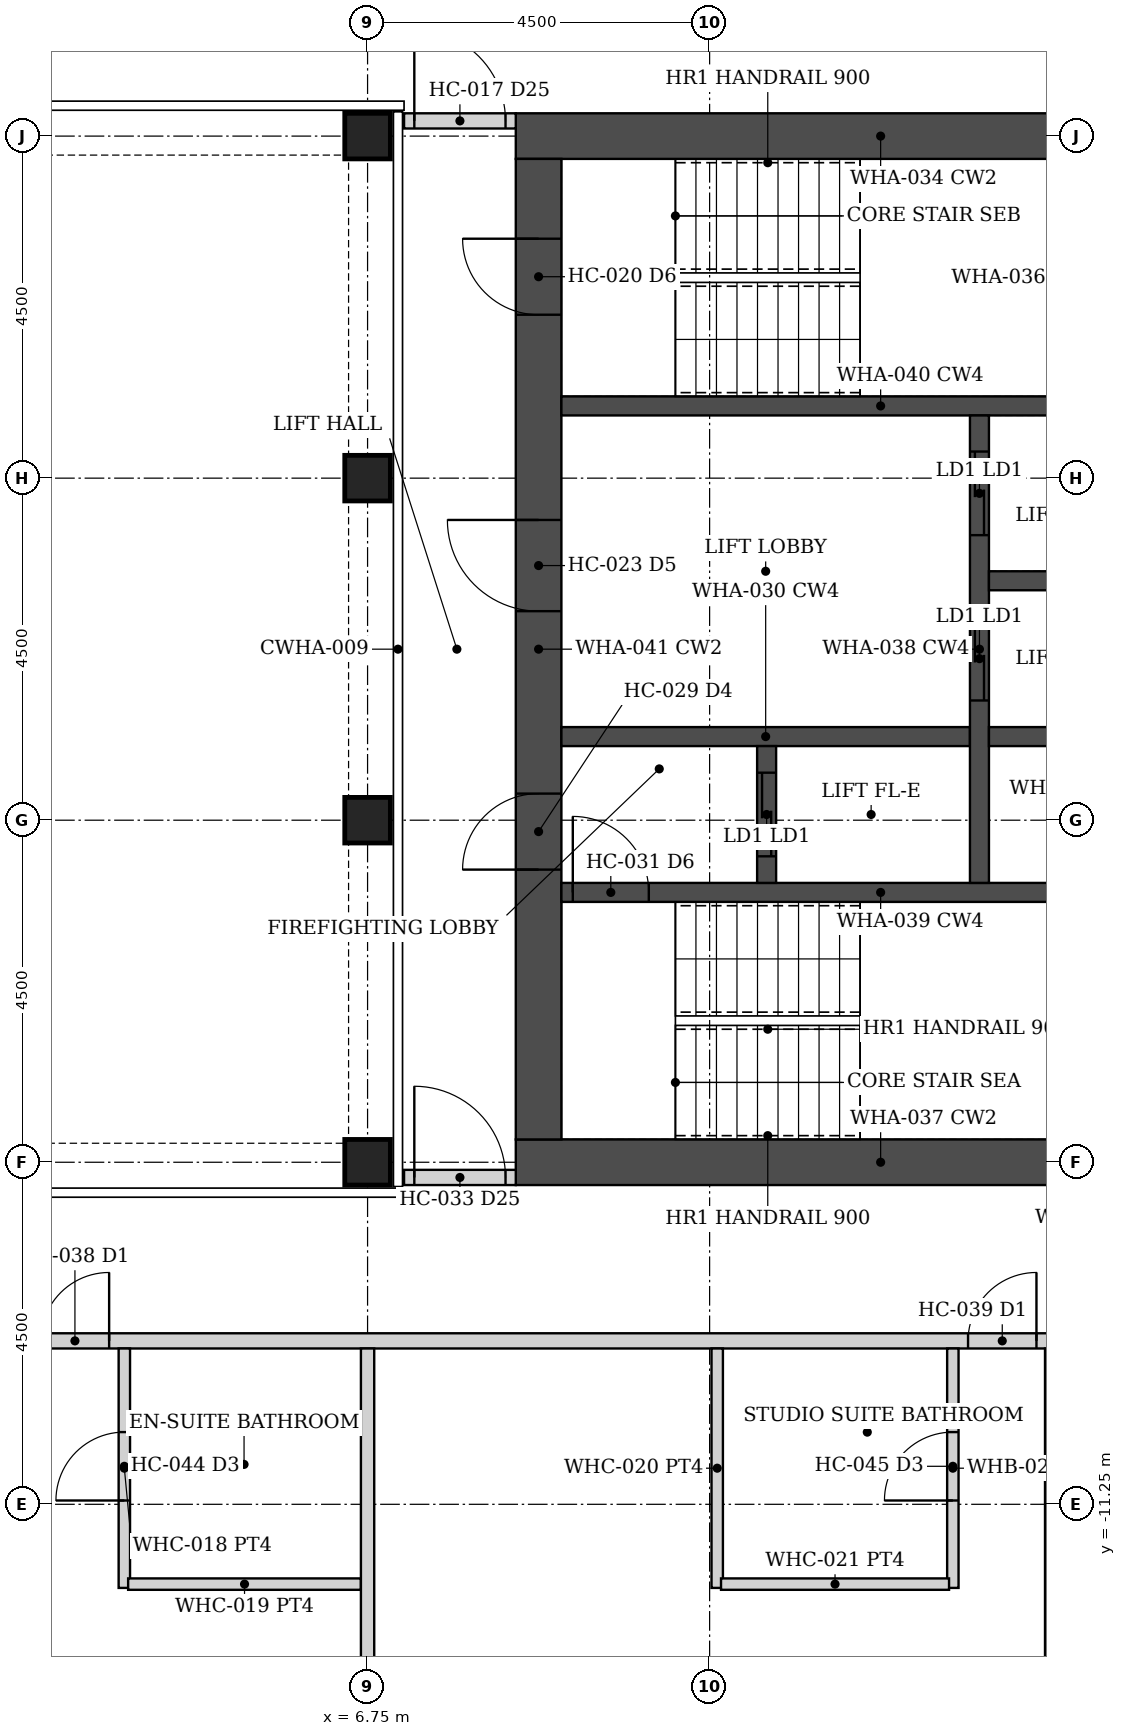
"""IFC4 building model, lengths in metres.
Left out: names, types, materials, properties, quantities, classifications, styles, units other than length and angle.
Written with IfcOpenShell. Run it as: python <this file> out.ifc"""

import sys

from ifc_helpers import new_model, si_unit, direction, frame, frame_2d, origin, origin_2d, place, context, subcontext, project, spatial, rectangle, hollow_rectangle, extrude, element, fill, save


model = new_model("IFC4")
c1 = context("Model", 3, precision=1e-05, world=origin(), true_north=direction((0.0, 1.0)))
c2 = subcontext(c1, "Body", "Model", "MODEL_VIEW")
j1 = project(units=[si_unit("LENGTHUNIT", "METRE"), si_unit("PLANEANGLEUNIT", "RADIAN")], contexts=[c1])
p1 = place(None, origin())
s1 = spatial("IfcSite", under=j1, at=p1, CompositionType="ELEMENT")
p2 = place(p1, origin())
s2 = spatial("IfcBuilding", under=s1, at=p2, CompositionType="ELEMENT")
p3 = place(p2, frame((0.0, 0.0, 140.0)))
s3 = spatial("IfcBuildingStorey", under=s2, at=p3, CompositionType="ELEMENT", Elevation=140.0)
for number, where, z_axis, x_axis in (
    (1, (6.75, -6.75, 0.0), (0.0, 0.0, 1.0), (1.0, 0.0, 0.0)),
    (2, (6.75, -2.25, 0.0), (0.0, 0.0, 1.0), (1.0, 0.0, 0.0)),
    (3, (6.75, 2.25, 0.0), (0.0, 0.0, 1.0), (1.0, 0.0, 0.0)),
    (4, (6.75, 6.75, 0.0), (0.0, 0.0, 1.0), (1.0, 0.0, 0.0)),
):
    element("IfcColumn", number, at=place(p3, frame(where, z_axis=z_axis, x_axis=x_axis)), inside=s3, PredefinedType="COLUMN", context=c2, shape_type="SweptSolid", body=[
        extrude(hollow_rectangle(XDim=0.6, YDim=0.6, WallThickness=0.04, at=origin_2d()), origin(), (0.0, 0.0, 1.0), 3.6),
    ])
for number, where, z_axis, x_axis in (
    (5, (8.7, -6.75, 0.0), (0.0, 0.0, 1.0), (1.0, 0.0, 0.0)),
    (6, (8.7, 6.75, 0.0), (0.0, 0.0, 1.0), (1.0, 0.0, 0.0)),
):
    element("IfcWall", number, at=place(p3, frame(where, z_axis=z_axis, x_axis=x_axis)), inside=s3, PredefinedType="SHEAR", context=c2, shape_type="SweptSolid", body=[
        extrude(rectangle(XDim=9.6, YDim=0.6, at=frame_2d((4.8, 0.0))), origin(), (0.0, 0.0, 1.0), 3.6),
    ])
p4 = place(p3, frame((9.0, -6.45, 0.0), z_axis=(0.0, 0.0, 1.0), x_axis=(0.0, 1.0, 0.0)))
e7 = element("IfcWall", 7, at=p4, inside=s3, PredefinedType="SHEAR", context=c2, shape_type="SweptSolid", body=[
    extrude(rectangle(XDim=12.9, YDim=0.6, at=frame_2d((6.45, 0.0))), origin(), (0.0, 0.0, 1.0), 3.6),
])
p5 = place(p4, frame((3.55, 0.0, 0.0)))
e8 = element("IfcOpeningElement", 8, at=p5, cuts=e7, PredefinedType="OPENING", context=c2, shape_type="SweptSolid", body=[
    extrude(rectangle(XDim=1.0, YDim=2.1, at=frame_2d((0.5, 1.05))), frame((0.0, 0.31, 0.0), z_axis=(0.0, -1.0, 0.0), x_axis=(1.0, 0.0, 0.0)), (0.0, 0.0, 1.0), 0.62),
])
p6 = place(p4, frame((6.95, 0.0, 0.0)))
e9 = element("IfcOpeningElement", 9, at=p6, cuts=e7, PredefinedType="OPENING", context=c2, shape_type="SweptSolid", body=[
    extrude(rectangle(XDim=1.2, YDim=2.1, at=frame_2d((0.6, 1.05))), frame((0.0, 0.31, 0.0), z_axis=(0.0, -1.0, 0.0), x_axis=(1.0, 0.0, 0.0)), (0.0, 0.0, 1.0), 0.62),
])
p7 = place(p4, frame((10.85, 0.0, 0.0)))
e10 = element("IfcOpeningElement", 10, at=p7, cuts=e7, PredefinedType="OPENING", context=c2, shape_type="SweptSolid", body=[
    extrude(rectangle(XDim=1.0, YDim=2.1, at=frame_2d((0.5, 1.05))), frame((0.0, 0.31, 0.0), z_axis=(0.0, -1.0, 0.0), x_axis=(1.0, 0.0, 0.0)), (0.0, 0.0, 1.0), 0.62),
])
p8 = place(p3, frame((9.3, -3.2, 0.0), z_axis=(0.0, 0.0, 1.0), x_axis=(1.0, 0.0, 0.0)))
e11 = element("IfcWall", 11, at=p8, inside=s3, PredefinedType="SHEAR", context=c2, shape_type="SweptSolid", body=[
    extrude(rectangle(XDim=8.4, YDim=0.25, at=frame_2d((4.2, 0.0))), origin(), (0.0, 0.0, 1.0), 3.6),
])
p9 = place(p8, frame((0.15, 0.0, 0.0)))
e12 = element("IfcOpeningElement", 12, at=p9, cuts=e11, PredefinedType="OPENING", context=c2, shape_type="SweptSolid", body=[
    extrude(rectangle(XDim=1.0, YDim=2.1, at=frame_2d((0.5, 1.05))), frame((0.0, 0.135, 0.0), z_axis=(0.0, -1.0, 0.0), x_axis=(1.0, 0.0, 0.0)), (0.0, 0.0, 1.0), 0.27),
])
p10 = place(p3, frame((9.3, 3.2, 0.0), z_axis=(0.0, 0.0, 1.0), x_axis=(1.0, 0.0, 0.0)))
e13 = element("IfcWall", 13, at=p10, inside=s3, PredefinedType="SHEAR", context=c2, shape_type="SweptSolid", body=[
    extrude(rectangle(XDim=8.4, YDim=0.25, at=frame_2d((4.2, 0.0))), origin(), (0.0, 0.0, 1.0), 3.6),
])
p11 = place(p3, frame((9.3, -1.15, 0.0), z_axis=(0.0, 0.0, 1.0), x_axis=(1.0, 0.0, 0.0)))
e14 = element("IfcWall", 14, at=p11, inside=s3, PredefinedType="SHEAR", context=c2, shape_type="SweptSolid", body=[
    extrude(rectangle(XDim=5.375, YDim=0.25, at=frame_2d((2.688, 0.0))), origin(), (0.0, 0.0, 1.0), 3.6),
])
p12 = place(p3, frame((12.0, -3.075, 0.0), z_axis=(0.0, 0.0, 1.0), x_axis=(0.0, 1.0, 0.0)))
e15 = element("IfcWall", 15, at=p12, inside=s3, PredefinedType="SHEAR", context=c2, shape_type="SweptSolid", body=[
    extrude(rectangle(XDim=1.8, YDim=0.25, at=frame_2d((0.9, 0.0))), origin(), (0.0, 0.0, 1.0), 3.6),
])
p13 = place(p12, frame((0.35, 0.0, 0.0)))
e16 = element("IfcOpeningElement", 16, at=p13, cuts=e15, PredefinedType="OPENING", context=c2, shape_type="SweptSolid", body=[
    extrude(rectangle(XDim=1.1, YDim=2.1, at=frame_2d((0.55, 1.05))), frame((0.0, 0.135, 0.0), z_axis=(0.0, -1.0, 0.0), x_axis=(1.0, 0.0, 0.0)), (0.0, 0.0, 1.0), 0.27),
])
p14 = place(p3, frame((14.8, -3.075, 0.0), z_axis=(0.0, 0.0, 1.0), x_axis=(0.0, 1.0, 0.0)))
e17 = element("IfcWall", 17, at=p14, inside=s3, PredefinedType="SHEAR", context=c2, shape_type="SweptSolid", body=[
    extrude(rectangle(XDim=6.15, YDim=0.25, at=frame_2d((3.075, 0.0))), origin(), (0.0, 0.0, 1.0), 3.6),
])
p15 = place(p14, frame((2.4, 0.0, 0.0)))
e18 = element("IfcOpeningElement", 18, at=p15, cuts=e17, PredefinedType="OPENING", context=c2, shape_type="SweptSolid", body=[
    extrude(rectangle(XDim=1.1, YDim=2.1, at=frame_2d((0.55, 1.05))), frame((0.0, 0.135, 0.0), z_axis=(0.0, -1.0, 0.0), x_axis=(1.0, 0.0, 0.0)), (0.0, 0.0, 1.0), 0.27),
])
p16 = place(p14, frame((4.575, 0.0, 0.0)))
e19 = element("IfcOpeningElement", 19, at=p16, cuts=e17, PredefinedType="OPENING", context=c2, shape_type="SweptSolid", body=[
    extrude(rectangle(XDim=1.1, YDim=2.1, at=frame_2d((0.55, 1.05))), frame((0.0, 0.135, 0.0), z_axis=(0.0, -1.0, 0.0), x_axis=(1.0, 0.0, 0.0)), (0.0, 0.0, 1.0), 0.27),
])
for number, where, z_axis, x_axis in (
    (20, (14.925, -1.15, 0.0), (0.0, 0.0, 1.0), (1.0, 0.0, 0.0)),
    (21, (14.925, 0.9, 0.0), (0.0, 0.0, 1.0), (1.0, 0.0, 0.0)),
):
    element("IfcWall", number, at=place(p3, frame(where, z_axis=z_axis, x_axis=x_axis)), inside=s3, PredefinedType="SHEAR", context=c2, shape_type="SweptSolid", body=[
        extrude(rectangle(XDim=2.775, YDim=0.25, at=frame_2d((1.387, 0.0))), origin(), (0.0, 0.0, 1.0), 3.6),
    ])
p17 = place(p3, frame((7.23, 6.95, 0.0), z_axis=(0.0, 0.0, 1.0), x_axis=(1.0, 0.0, 0.0)))
e22 = element("IfcWall", 22, at=p17, inside=s3, PredefinedType="PARTITIONING", context=c2, shape_type="SweptSolid", body=[
    extrude(rectangle(XDim=1.47, YDim=0.2, at=frame_2d((0.735, 0.0))), origin(), (0.0, 0.0, 1.0), 2.473),
])
p18 = place(p17, frame((0.135, 0.0, 0.0)))
e23 = element("IfcOpeningElement", 23, at=p18, cuts=e22, PredefinedType="OPENING", context=c2, shape_type="SweptSolid", body=[
    extrude(rectangle(XDim=1.2, YDim=2.1, at=frame_2d((0.6, 1.05))), frame((0.0, 0.11, 0.0), z_axis=(0.0, -1.0, 0.0), x_axis=(1.0, 0.0, 0.0)), (0.0, 0.0, 1.0), 0.22),
])
p19 = place(p3, frame((7.23, -6.95, 0.0), z_axis=(0.0, 0.0, 1.0), x_axis=(1.0, 0.0, 0.0)))
e24 = element("IfcWall", 24, at=p19, inside=s3, PredefinedType="PARTITIONING", context=c2, shape_type="SweptSolid", body=[
    extrude(rectangle(XDim=1.47, YDim=0.2, at=frame_2d((0.735, 0.0))), origin(), (0.0, 0.0, 1.0), 2.473),
])
p20 = place(p19, frame((0.135, 0.0, 0.0)))
e25 = element("IfcOpeningElement", 25, at=p20, cuts=e24, PredefinedType="OPENING", context=c2, shape_type="SweptSolid", body=[
    extrude(rectangle(XDim=1.2, YDim=2.1, at=frame_2d((0.6, 1.05))), frame((0.0, 0.11, 0.0), z_axis=(0.0, -1.0, 0.0), x_axis=(1.0, 0.0, 0.0)), (0.0, 0.0, 1.0), 0.22),
])
p21 = place(p3, frame((-22.3, -9.1, 0.0), z_axis=(0.0, 0.0, 1.0), x_axis=(1.0, 0.0, 0.0)))
e26 = element("IfcWall", 26, at=p21, inside=s3, PredefinedType="PARTITIONING", context=c2, shape_type="SweptSolid", body=[
    extrude(rectangle(XDim=44.6, YDim=0.2, at=frame_2d((22.3, 0.0))), origin(), (0.0, 0.0, 1.0), 2.473),
])
p22 = place(p21, frame((6.75, 0.0, 0.0)))
e27 = element("IfcOpeningElement", 27, at=p22, cuts=e26, PredefinedType="OPENING", context=c2, shape_type="SweptSolid", body=[
    extrude(rectangle(XDim=0.9, YDim=2.1, at=frame_2d((0.45, 1.05))), frame((0.0, 0.11, 0.0), z_axis=(0.0, -1.0, 0.0), x_axis=(1.0, 0.0, 0.0)), (0.0, 0.0, 1.0), 0.22),
])
p23 = place(p21, frame((14.45, 0.0, 0.0)))
e28 = element("IfcOpeningElement", 28, at=p23, cuts=e26, PredefinedType="OPENING", context=c2, shape_type="SweptSolid", body=[
    extrude(rectangle(XDim=0.9, YDim=2.1, at=frame_2d((0.45, 1.05))), frame((0.0, 0.11, 0.0), z_axis=(0.0, -1.0, 0.0), x_axis=(1.0, 0.0, 0.0)), (0.0, 0.0, 1.0), 0.22),
])
p24 = place(p21, frame((15.75, 0.0, 0.0)))
e29 = element("IfcOpeningElement", 29, at=p24, cuts=e26, PredefinedType="OPENING", context=c2, shape_type="SweptSolid", body=[
    extrude(rectangle(XDim=0.9, YDim=2.1, at=frame_2d((0.45, 1.05))), frame((0.0, 0.11, 0.0), z_axis=(0.0, -1.0, 0.0), x_axis=(1.0, 0.0, 0.0)), (0.0, 0.0, 1.0), 0.22),
])
p25 = place(p21, frame((24.75, 0.0, 0.0)))
e30 = element("IfcOpeningElement", 30, at=p25, cuts=e26, PredefinedType="OPENING", context=c2, shape_type="SweptSolid", body=[
    extrude(rectangle(XDim=0.9, YDim=2.1, at=frame_2d((0.45, 1.05))), frame((0.0, 0.11, 0.0), z_axis=(0.0, -1.0, 0.0), x_axis=(1.0, 0.0, 0.0)), (0.0, 0.0, 1.0), 0.22),
])
p26 = place(p21, frame((36.95, 0.0, 0.0)))
e31 = element("IfcOpeningElement", 31, at=p26, cuts=e26, PredefinedType="OPENING", context=c2, shape_type="SweptSolid", body=[
    extrude(rectangle(XDim=0.9, YDim=2.1, at=frame_2d((0.45, 1.05))), frame((0.0, 0.11, 0.0), z_axis=(0.0, -1.0, 0.0), x_axis=(1.0, 0.0, 0.0)), (0.0, 0.0, 1.0), 0.22),
])
p27 = place(p21, frame((38.85, 0.0, 0.0)))
e32 = element("IfcOpeningElement", 32, at=p27, cuts=e26, PredefinedType="OPENING", context=c2, shape_type="SweptSolid", body=[
    extrude(rectangle(XDim=0.9, YDim=2.1, at=frame_2d((0.45, 1.05))), frame((0.0, 0.11, 0.0), z_axis=(0.0, -1.0, 0.0), x_axis=(1.0, 0.0, 0.0)), (0.0, 0.0, 1.0), 0.22),
])
p28 = place(p21, frame((4.85, 0.0, 0.0)))
e33 = element("IfcOpeningElement", 33, at=p28, cuts=e26, PredefinedType="OPENING", context=c2, shape_type="SweptSolid", body=[
    extrude(rectangle(XDim=0.9, YDim=2.1, at=frame_2d((0.45, 1.05))), frame((0.0, 0.11, 0.0), z_axis=(0.0, -1.0, 0.0), x_axis=(1.0, 0.0, 0.0)), (0.0, 0.0, 1.0), 0.22),
])
p29 = place(p3, frame((3.55, -12.35, 0.0), z_axis=(0.0, 0.0, 1.0), x_axis=(0.0, 1.0, 0.0)))
e34 = element("IfcWall", 34, at=p29, inside=s3, PredefinedType="PARTITIONING", context=c2, shape_type="SweptSolid", body=[
    extrude(rectangle(XDim=3.15, YDim=0.15, at=frame_2d((1.575, 0.0))), origin(), (0.0, 0.0, 1.0), 2.473),
])
p30 = place(p29, frame((1.15, 0.0, 0.0)))
e35 = element("IfcOpeningElement", 35, at=p30, cuts=e34, PredefinedType="OPENING", context=c2, shape_type="SweptSolid", body=[
    extrude(rectangle(XDim=0.9, YDim=2.1, at=frame_2d((0.45, 1.05))), frame((0.0, 0.085, 0.0), z_axis=(0.0, -1.0, 0.0), x_axis=(1.0, 0.0, 0.0)), (0.0, 0.0, 1.0), 0.17),
])
p31 = place(p3, frame((3.6, -12.3, 0.0), z_axis=(0.0, 0.0, 1.0), x_axis=(1.0, 0.0, 0.0)))
e36 = element("IfcWall", 36, at=p31, inside=s3, PredefinedType="PARTITIONING", context=c2, shape_type="SweptSolid", body=[
    extrude(rectangle(XDim=3.062, YDim=0.15, at=frame_2d((1.531, 0.0))), origin(), (0.0, 0.0, 1.0), 2.473),
])
p32 = place(p3, frame((14.45, -12.35, 0.0), z_axis=(0.0, 0.0, 1.0), x_axis=(0.0, 1.0, 0.0)))
e37 = element("IfcWall", 37, at=p32, inside=s3, PredefinedType="PARTITIONING", context=c2, shape_type="SweptSolid", body=[
    extrude(rectangle(XDim=3.15, YDim=0.15, at=frame_2d((1.575, 0.0))), origin(), (0.0, 0.0, 1.0), 2.473),
])
p33 = place(p32, frame((1.15, 0.0, 0.0)))
e38 = element("IfcOpeningElement", 38, at=p33, cuts=e37, PredefinedType="OPENING", context=c2, shape_type="SweptSolid", body=[
    extrude(rectangle(XDim=0.9, YDim=2.1, at=frame_2d((0.45, 1.05))), frame((0.0, 0.085, 0.0), z_axis=(0.0, -1.0, 0.0), x_axis=(1.0, 0.0, 0.0)), (0.0, 0.0, 1.0), 0.17),
])
p34 = place(p3, frame((11.35, -12.35, 0.0), z_axis=(0.0, 0.0, 1.0), x_axis=(0.0, 1.0, 0.0)))
e39 = element("IfcWall", 39, at=p34, inside=s3, PredefinedType="PARTITIONING", context=c2, shape_type="SweptSolid", body=[
    extrude(rectangle(XDim=3.15, YDim=0.15, at=frame_2d((1.575, 0.0))), origin(), (0.0, 0.0, 1.0), 2.473),
])
p35 = place(p3, frame((11.4, -12.3, 0.0), z_axis=(0.0, 0.0, 1.0), x_axis=(1.0, 0.0, 0.0)))
e40 = element("IfcWall", 40, at=p35, inside=s3, PredefinedType="PARTITIONING", context=c2, shape_type="SweptSolid", body=[
    extrude(rectangle(XDim=3.0, YDim=0.15, at=frame_2d((1.5, 0.0))), origin(), (0.0, 0.0, 1.0), 2.473),
])
for number, where, z_axis, x_axis in (
    (41, (6.75, -22.1, 0.0), (0.0, 0.0, 1.0), (0.0, 1.0, 0.0)),
    (42, (15.75, -22.1, 0.0), (0.0, 0.0, 1.0), (0.0, 1.0, 0.0)),
):
    element("IfcWall", number, at=place(p3, frame(where, z_axis=z_axis, x_axis=x_axis)), inside=s3, PredefinedType="PARTITIONING", context=c2, shape_type="SweptSolid", body=[
        extrude(rectangle(XDim=12.9, YDim=0.175, at=frame_2d((6.45, 0.0))), origin(), (0.0, 0.0, 1.0), 2.473),
    ])
p36 = place(p18, origin())
e43 = element("IfcDoor", 43, at=p36, inside=s3, OperationType="DOUBLE_DOOR_DOUBLE_SWING", PredefinedType="DOOR", context=c2, shape_type="SweptSolid", body=[
    extrude(rectangle(XDim=1.2, YDim=2.1, at=frame_2d((0.6, 1.05))), frame((0.0, 0.025, 0.0), z_axis=(0.0, -1.0, 0.0), x_axis=(1.0, 0.0, 0.0)), (0.0, 0.0, 1.0), 0.05),
])
fill(e23, e43)
p37 = place(p20, origin())
e44 = element("IfcDoor", 44, at=p37, inside=s3, OperationType="DOUBLE_DOOR_DOUBLE_SWING", PredefinedType="DOOR", context=c2, shape_type="SweptSolid", body=[
    extrude(rectangle(XDim=1.2, YDim=2.1, at=frame_2d((0.6, 1.05))), frame((0.0, 0.025, 0.0), z_axis=(0.0, -1.0, 0.0), x_axis=(1.0, 0.0, 0.0)), (0.0, 0.0, 1.0), 0.05),
])
fill(e25, e44)
p38 = place(p25, origin())
e45 = element("IfcDoor", 45, at=p38, inside=s3, OperationType="SINGLE_SWING_RIGHT", PredefinedType="DOOR", context=c2, shape_type="SweptSolid", body=[
    extrude(rectangle(XDim=0.9, YDim=2.1, at=frame_2d((0.45, 1.05))), frame((0.0, 0.025, 0.0), z_axis=(0.0, -1.0, 0.0), x_axis=(1.0, 0.0, 0.0)), (0.0, 0.0, 1.0), 0.05),
])
fill(e30, e45)
p39 = place(p30, origin())
e46 = element("IfcDoor", 46, at=p39, inside=s3, OperationType="SINGLE_SWING_LEFT", PredefinedType="DOOR", context=c2, shape_type="SweptSolid", body=[
    extrude(rectangle(XDim=0.9, YDim=2.1, at=frame_2d((0.45, 1.05))), frame((0.0, 0.025, 0.0), z_axis=(0.0, -1.0, 0.0), x_axis=(1.0, 0.0, 0.0)), (0.0, 0.0, 1.0), 0.05),
])
fill(e35, e46)
p40 = place(p26, origin())
e47 = element("IfcDoor", 47, at=p40, inside=s3, OperationType="SINGLE_SWING_RIGHT", PredefinedType="DOOR", context=c2, shape_type="SweptSolid", body=[
    extrude(rectangle(XDim=0.9, YDim=2.1, at=frame_2d((0.45, 1.05))), frame((0.0, 0.025, 0.0), z_axis=(0.0, -1.0, 0.0), x_axis=(1.0, 0.0, 0.0)), (0.0, 0.0, 1.0), 0.05),
])
fill(e31, e47)
p41 = place(p33, origin())
e48 = element("IfcDoor", 48, at=p41, inside=s3, OperationType="SINGLE_SWING_LEFT", PredefinedType="DOOR", context=c2, shape_type="SweptSolid", body=[
    extrude(rectangle(XDim=0.9, YDim=2.1, at=frame_2d((0.45, 1.05))), frame((0.0, 0.025, 0.0), z_axis=(0.0, -1.0, 0.0), x_axis=(1.0, 0.0, 0.0)), (0.0, 0.0, 1.0), 0.05),
])
fill(e38, e48)
p42 = place(p5, origin())
e49 = element("IfcDoor", 49, at=p42, inside=s3, OperationType="SINGLE_SWING_LEFT", PredefinedType="DOOR", context=c2, shape_type="SweptSolid", body=[
    extrude(rectangle(XDim=1.0, YDim=2.1, at=frame_2d((0.5, 1.05))), frame((0.0, 0.025, 0.0), z_axis=(0.0, -1.0, 0.0), x_axis=(1.0, 0.0, 0.0)), (0.0, 0.0, 1.0), 0.05),
])
fill(e8, e49)
p43 = place(p9, origin())
e50 = element("IfcDoor", 50, at=p43, inside=s3, OperationType="SINGLE_SWING_LEFT", PredefinedType="DOOR", context=c2, shape_type="SweptSolid", body=[
    extrude(rectangle(XDim=1.0, YDim=2.1, at=frame_2d((0.5, 1.05))), frame((0.0, 0.025, 0.0), z_axis=(0.0, -1.0, 0.0), x_axis=(1.0, 0.0, 0.0)), (0.0, 0.0, 1.0), 0.05),
])
fill(e12, e50)
p44 = place(p6, origin())
e51 = element("IfcDoor", 51, at=p44, inside=s3, OperationType="SINGLE_SWING_RIGHT", PredefinedType="DOOR", context=c2, shape_type="SweptSolid", body=[
    extrude(rectangle(XDim=1.2, YDim=2.1, at=frame_2d((0.6, 1.05))), frame((0.0, 0.025, 0.0), z_axis=(0.0, -1.0, 0.0), x_axis=(1.0, 0.0, 0.0)), (0.0, 0.0, 1.0), 0.05),
])
fill(e9, e51)
p45 = place(p7, origin())
e52 = element("IfcDoor", 52, at=p45, inside=s3, OperationType="SINGLE_SWING_RIGHT", PredefinedType="DOOR", context=c2, shape_type="SweptSolid", body=[
    extrude(rectangle(XDim=1.0, YDim=2.1, at=frame_2d((0.5, 1.05))), frame((0.0, 0.025, 0.0), z_axis=(0.0, -1.0, 0.0), x_axis=(1.0, 0.0, 0.0)), (0.0, 0.0, 1.0), 0.05),
])
fill(e10, e52)
p46 = place(p13, origin())
e53 = element("IfcDoor", 53, at=p46, inside=s3, OperationType="DOUBLE_DOOR_SLIDING", PredefinedType="DOOR", context=c2, shape_type="SweptSolid", body=[
    extrude(rectangle(XDim=1.1, YDim=2.1, at=frame_2d((0.55, 1.05))), frame((0.0, 0.025, 0.0), z_axis=(0.0, -1.0, 0.0), x_axis=(1.0, 0.0, 0.0)), (0.0, 0.0, 1.0), 0.05),
])
fill(e16, e53)
p47 = place(p15, origin())
e54 = element("IfcDoor", 54, at=p47, inside=s3, OperationType="DOUBLE_DOOR_SLIDING", PredefinedType="DOOR", context=c2, shape_type="SweptSolid", body=[
    extrude(rectangle(XDim=1.1, YDim=2.1, at=frame_2d((0.55, 1.05))), frame((0.0, 0.025, 0.0), z_axis=(0.0, -1.0, 0.0), x_axis=(1.0, 0.0, 0.0)), (0.0, 0.0, 1.0), 0.05),
])
fill(e18, e54)
p48 = place(p16, origin())
e55 = element("IfcDoor", 55, at=p48, inside=s3, OperationType="DOUBLE_DOOR_SLIDING", PredefinedType="DOOR", context=c2, shape_type="SweptSolid", body=[
    extrude(rectangle(XDim=1.1, YDim=2.1, at=frame_2d((0.55, 1.05))), frame((0.0, 0.025, 0.0), z_axis=(0.0, -1.0, 0.0), x_axis=(1.0, 0.0, 0.0)), (0.0, 0.0, 1.0), 0.05),
])
fill(e19, e55)
save(model, sys.argv[1])
